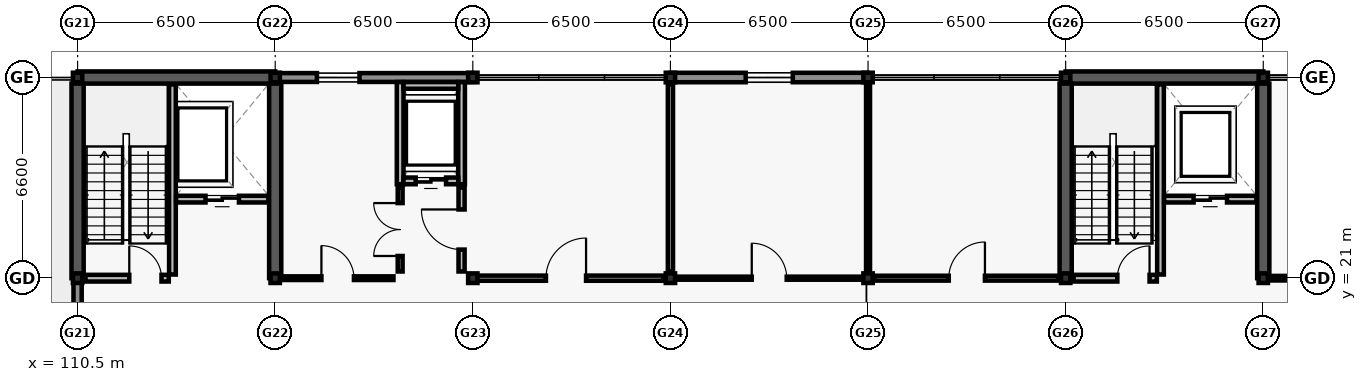
"""IFC4 building model, lengths in metres.
Left out: names, types, materials, properties, quantities, classifications, styles, units other than length and angle.
Written with IfcOpenShell. Run it as: python <this file> out.ifc"""

import sys

from ifc_helpers import new_model, si_unit, direction, frame, frame_2d, origin, origin_2d, place, context, subcontext, project, spatial, rectangle, i_section, extrude, element, fill, save


model = new_model("IFC4")
c1 = context("Model", 3, precision=1e-05, world=origin(), true_north=direction((0.0, 1.0)))
c2 = subcontext(c1, "Body", "Model", "MODEL_VIEW")
j1 = project(units=[si_unit("LENGTHUNIT", "METRE"), si_unit("PLANEANGLEUNIT", "RADIAN")], contexts=[c1])
p1 = place(None, origin())
s1 = spatial("IfcSite", under=j1, at=p1, CompositionType="ELEMENT")
p2 = place(p1, origin())
s2 = spatial("IfcBuilding", under=s1, at=p2, CompositionType="ELEMENT")
p3 = place(p2, frame((0.0, 0.0, 13.5)))
s3 = spatial("IfcBuildingStorey", under=s2, at=p3, CompositionType="ELEMENT", Elevation=13.5)
for number, where, z_axis, x_axis in (
    (1, (110.5, 21.0, 0.0), (0.0, 0.0, 1.0), (1.0, 0.0, 0.0)),
    (2, (110.5, 27.6, 0.0), (0.0, 0.0, 1.0), (1.0, 0.0, 0.0)),
    (3, (117.0, 21.0, 0.0), (0.0, 0.0, 1.0), (1.0, 0.0, 0.0)),
    (4, (117.0, 27.6, 0.0), (0.0, 0.0, 1.0), (1.0, 0.0, 0.0)),
    (5, (123.5, 21.0, 0.0), (0.0, 0.0, 1.0), (1.0, 0.0, 0.0)),
    (6, (123.5, 27.6, 0.0), (0.0, 0.0, 1.0), (1.0, 0.0, 0.0)),
    (7, (130.0, 21.0, 0.0), (0.0, 0.0, 1.0), (1.0, 0.0, 0.0)),
    (8, (130.0, 27.6, 0.0), (0.0, 0.0, 1.0), (1.0, 0.0, 0.0)),
    (9, (136.5, 21.0, 0.0), (0.0, 0.0, 1.0), (1.0, 0.0, 0.0)),
    (10, (136.5, 27.6, 0.0), (0.0, 0.0, 1.0), (1.0, 0.0, 0.0)),
    (11, (143.0, 21.0, 0.0), (0.0, 0.0, 1.0), (1.0, 0.0, 0.0)),
    (12, (143.0, 27.6, 0.0), (0.0, 0.0, 1.0), (1.0, 0.0, 0.0)),
    (13, (149.5, 21.0, 0.0), (0.0, 0.0, 1.0), (1.0, 0.0, 0.0)),
    (14, (149.5, 27.6, 0.0), (0.0, 0.0, 1.0), (1.0, 0.0, 0.0)),
):
    element("IfcColumn", number, at=place(p3, frame(where, z_axis=z_axis, x_axis=x_axis)), inside=s3, PredefinedType="COLUMN", context=c2, shape_type="SweptSolid", body=[
        extrude(i_section(OverallWidth=0.307, OverallDepth=0.315, WebThickness=0.012, FlangeThickness=0.019, FilletRadius=0.017, at=origin_2d()), origin(), (0.0, 0.0, 1.0), 3.9),
    ])
p4 = place(p3, frame((110.5, 27.6, 0.0), z_axis=(0.0, 0.0, 1.0), x_axis=(1.0, 0.0, 0.0)))
e15 = element("IfcWall", 15, at=p4, inside=s3, PredefinedType="SHEAR", context=c2, shape_type="SweptSolid", body=[
    extrude(rectangle(XDim=6.5, YDim=0.4, at=frame_2d((3.25, 0.0))), origin(), (0.0, 0.0, 1.0), 3.66),
])
for number, where, z_axis, x_axis in (
    (16, (110.5, 21.0, 0.0), (0.0, 0.0, 1.0), (0.0, 1.0, 0.0)),
    (17, (117.0, 21.0, 0.0), (0.0, 0.0, 1.0), (0.0, 1.0, 0.0)),
):
    element("IfcWall", number, at=place(p3, frame(where, z_axis=z_axis, x_axis=x_axis)), inside=s3, PredefinedType="SHEAR", context=c2, shape_type="SweptSolid", body=[
        extrude(rectangle(XDim=6.4, YDim=0.4, at=frame_2d((3.2, 0.0))), origin(), (0.0, 0.0, 1.0), 3.66),
    ])
p5 = place(p3, frame((143.0, 27.6, 0.0), z_axis=(0.0, 0.0, 1.0), x_axis=(1.0, 0.0, 0.0)))
e18 = element("IfcWall", 18, at=p5, inside=s3, PredefinedType="SHEAR", context=c2, shape_type="SweptSolid", body=[
    extrude(rectangle(XDim=6.5, YDim=0.4, at=frame_2d((3.25, 0.0))), origin(), (0.0, 0.0, 1.0), 3.66),
])
for number, where, z_axis, x_axis in (
    (19, (143.0, 21.0, 0.0), (0.0, 0.0, 1.0), (0.0, 1.0, 0.0)),
    (20, (149.5, 21.0, 0.0), (0.0, 0.0, 1.0), (0.0, 1.0, 0.0)),
):
    element("IfcWall", number, at=place(p3, frame(where, z_axis=z_axis, x_axis=x_axis)), inside=s3, PredefinedType="SHEAR", context=c2, shape_type="SweptSolid", body=[
        extrude(rectangle(XDim=6.4, YDim=0.4, at=frame_2d((3.2, 0.0))), origin(), (0.0, 0.0, 1.0), 3.66),
    ])
p6 = place(p3, frame((117.005, 27.6, 0.0), z_axis=(0.0, 0.0, 1.0), x_axis=(1.0, 0.0, 0.0)))
e21 = element("IfcWall", 21, at=p6, inside=s3, PredefinedType="SOLIDWALL", context=c2, shape_type="SweptSolid", body=[
    extrude(rectangle(XDim=6.49, YDim=0.29, at=frame_2d((3.245, 0.0))), origin(), (0.0, 0.0, 1.0), 3.02),
])
p7 = place(p6, frame((1.367, 0.0, 0.8)))
e22 = element("IfcOpeningElement", 22, at=p7, cuts=e21, PredefinedType="OPENING", context=c2, shape_type="SweptSolid", body=[
    extrude(rectangle(XDim=1.4, YDim=1.5, at=frame_2d((0.7, 0.75))), frame((0.0, 0.155, 0.0), z_axis=(0.0, -1.0, 0.0), x_axis=(1.0, 0.0, 0.0)), (0.0, 0.0, 1.0), 0.31),
])
p8 = place(p3, frame((130.005, 27.6, 0.0), z_axis=(0.0, 0.0, 1.0), x_axis=(1.0, 0.0, 0.0)))
e23 = element("IfcWall", 23, at=p8, inside=s3, PredefinedType="SOLIDWALL", context=c2, shape_type="SweptSolid", body=[
    extrude(rectangle(XDim=6.49, YDim=0.31, at=frame_2d((3.245, 0.0))), origin(), (0.0, 0.0, 1.0), 3.02),
])
p9 = place(p8, frame((2.47, 0.0, 0.8)))
e24 = element("IfcOpeningElement", 24, at=p9, cuts=e23, PredefinedType="OPENING", context=c2, shape_type="SweptSolid", body=[
    extrude(rectangle(XDim=1.55, YDim=1.5, at=frame_2d((0.775, 0.75))), frame((0.0, 0.165, 0.0), z_axis=(0.0, -1.0, 0.0), x_axis=(1.0, 0.0, 0.0)), (0.0, 0.0, 1.0), 0.33),
])
p10 = place(p3, frame((110.5, 14.405, 0.0), z_axis=(0.0, 0.0, 1.0), x_axis=(0.0, 1.0, 0.0)))
e25 = element("IfcWall", 25, at=p10, inside=s3, PredefinedType="SOLIDWALL", context=c2, shape_type="SweptSolid", body=[
    extrude(rectangle(XDim=6.59, YDim=0.27, at=frame_2d((3.295, 0.0))), origin(), (0.0, 0.0, 1.0), 3.02),
])
p11 = place(p10, frame((2.785, 0.0, 0.0)))
e26 = element("IfcOpeningElement", 26, at=p11, cuts=e25, PredefinedType="OPENING", context=c2, shape_type="SweptSolid", body=[
    extrude(rectangle(XDim=1.02, YDim=2.14, at=frame_2d((0.51, 1.07))), frame((0.0, 0.145, 0.0), z_axis=(0.0, -1.0, 0.0), x_axis=(1.0, 0.0, 0.0)), (0.0, 0.0, 1.0), 0.29),
])
p12 = place(p3, frame((113.62, 21.12, 0.0), z_axis=(0.0, 0.0, 1.0), x_axis=(0.0, 1.0, 0.0)))
e27 = element("IfcWall", 27, at=p12, inside=s3, PredefinedType="SOLIDWALL", context=c2, shape_type="SweptSolid", body=[
    extrude(rectangle(XDim=6.255, YDim=0.22, at=frame_2d((3.127, 0.0))), origin(), (0.0, 0.0, 1.0), 3.66),
])
p13 = place(p3, frame((110.76, 21.0, 0.0), z_axis=(0.0, 0.0, 1.0), x_axis=(1.0, 0.0, 0.0)))
e28 = element("IfcWall", 28, at=p13, inside=s3, PredefinedType="SOLIDWALL", context=c2, shape_type="SweptSolid", body=[
    extrude(rectangle(XDim=2.74, YDim=0.22, at=frame_2d((1.37, 0.0))), origin(), (0.0, 0.0, 1.0), 3.02),
])
p14 = place(p13, frame((1.44, 0.0, 0.0)))
e29 = element("IfcOpeningElement", 29, at=p14, cuts=e28, PredefinedType="OPENING", context=c2, shape_type="SweptSolid", body=[
    extrude(rectangle(XDim=1.06, YDim=2.1, at=frame_2d((0.53, 1.05))), frame((0.0, 0.12, 0.0), z_axis=(0.0, -1.0, 0.0), x_axis=(1.0, 0.0, 0.0)), (0.0, 0.0, 1.0), 0.24),
])
p15 = place(p3, frame((113.74, 23.6, 0.0), z_axis=(0.0, 0.0, 1.0), x_axis=(1.0, 0.0, 0.0)))
e30 = element("IfcWall", 30, at=p15, inside=s3, PredefinedType="SOLIDWALL", context=c2, shape_type="SweptSolid", body=[
    extrude(rectangle(XDim=3.035, YDim=0.22, at=frame_2d((1.518, 0.0))), origin(), (0.0, 0.0, 1.0), 3.66),
])
p16 = place(p15, frame((0.968, 0.0, 0.0)))
e31 = element("IfcOpeningElement", 31, at=p16, cuts=e30, PredefinedType="OPENING", context=c2, shape_type="SweptSolid", body=[
    extrude(rectangle(XDim=1.1, YDim=2.1, at=frame_2d((0.55, 1.05))), frame((0.0, 0.12, 0.0), z_axis=(0.0, -1.0, 0.0), x_axis=(1.0, 0.0, 0.0)), (0.0, 0.0, 1.0), 0.24),
])
for number, where, z_axis, x_axis in (
    (32, (121.11, 24.09, 0.0), (0.0, 0.0, 1.0), (0.0, 1.0, 0.0)),
    (33, (123.13, 24.09, 0.0), (0.0, 0.0, 1.0), (0.0, 1.0, 0.0)),
):
    element("IfcWall", number, at=place(p3, frame(where, z_axis=z_axis, x_axis=x_axis)), inside=s3, PredefinedType="SOLIDWALL", context=c2, shape_type="SweptSolid", body=[
        extrude(rectangle(XDim=3.36, YDim=0.22, at=frame_2d((1.68, 0.0))), origin(), (0.0, 0.0, 1.0), 3.66),
    ])
p17 = place(p3, frame((121.22, 27.34, 0.0), z_axis=(0.0, 0.0, 1.0), x_axis=(1.0, 0.0, 0.0)))
e34 = element("IfcWall", 34, at=p17, inside=s3, PredefinedType="SOLIDWALL", context=c2, shape_type="SweptSolid", body=[
    extrude(rectangle(XDim=1.8, YDim=0.22, at=frame_2d((0.9, 0.0))), origin(), (0.0, 0.0, 1.0), 3.66),
])
p18 = place(p3, frame((121.22, 24.2, 0.0), z_axis=(0.0, 0.0, 1.0), x_axis=(1.0, 0.0, 0.0)))
e35 = element("IfcWall", 35, at=p18, inside=s3, PredefinedType="SOLIDWALL", context=c2, shape_type="SweptSolid", body=[
    extrude(rectangle(XDim=1.8, YDim=0.22, at=frame_2d((0.9, 0.0))), origin(), (0.0, 0.0, 1.0), 3.66),
])
p19 = place(p18, frame((0.4, 0.0, 0.0)))
e36 = element("IfcOpeningElement", 36, at=p19, cuts=e35, PredefinedType="OPENING", context=c2, shape_type="SweptSolid", body=[
    extrude(rectangle(XDim=1.0, YDim=2.1, at=frame_2d((0.5, 1.05))), frame((0.0, 0.12, 0.0), z_axis=(0.0, -1.0, 0.0), x_axis=(1.0, 0.0, 0.0)), (0.0, 0.0, 1.0), 0.24),
])
p20 = place(p3, frame((146.12, 21.12, 0.0), z_axis=(0.0, 0.0, 1.0), x_axis=(0.0, 1.0, 0.0)))
e37 = element("IfcWall", 37, at=p20, inside=s3, PredefinedType="SOLIDWALL", context=c2, shape_type="SweptSolid", body=[
    extrude(rectangle(XDim=6.255, YDim=0.22, at=frame_2d((3.127, 0.0))), origin(), (0.0, 0.0, 1.0), 3.66),
])
p21 = place(p3, frame((143.26, 21.0, 0.0), z_axis=(0.0, 0.0, 1.0), x_axis=(1.0, 0.0, 0.0)))
e38 = element("IfcWall", 38, at=p21, inside=s3, PredefinedType="SOLIDWALL", context=c2, shape_type="SweptSolid", body=[
    extrude(rectangle(XDim=2.74, YDim=0.22, at=frame_2d((1.37, 0.0))), origin(), (0.0, 0.0, 1.0), 3.02),
])
p22 = place(p21, frame((1.44, 0.0, 0.0)))
e39 = element("IfcOpeningElement", 39, at=p22, cuts=e38, PredefinedType="OPENING", context=c2, shape_type="SweptSolid", body=[
    extrude(rectangle(XDim=1.06, YDim=2.1, at=frame_2d((0.53, 1.05))), frame((0.0, 0.12, 0.0), z_axis=(0.0, -1.0, 0.0), x_axis=(1.0, 0.0, 0.0)), (0.0, 0.0, 1.0), 0.24),
])
p23 = place(p3, frame((146.24, 23.6, 0.0), z_axis=(0.0, 0.0, 1.0), x_axis=(1.0, 0.0, 0.0)))
e40 = element("IfcWall", 40, at=p23, inside=s3, PredefinedType="SOLIDWALL", context=c2, shape_type="SweptSolid", body=[
    extrude(rectangle(XDim=3.035, YDim=0.22, at=frame_2d((1.518, 0.0))), origin(), (0.0, 0.0, 1.0), 3.66),
])
p24 = place(p23, frame((0.968, 0.0, 0.0)))
e41 = element("IfcOpeningElement", 41, at=p24, cuts=e40, PredefinedType="OPENING", context=c2, shape_type="SweptSolid", body=[
    extrude(rectangle(XDim=1.1, YDim=2.1, at=frame_2d((0.55, 1.05))), frame((0.0, 0.12, 0.0), z_axis=(0.0, -1.0, 0.0), x_axis=(1.0, 0.0, 0.0)), (0.0, 0.0, 1.0), 0.24),
])
p25 = place(p3, frame((121.11, 21.22, 0.0), z_axis=(0.0, 0.0, 1.0), x_axis=(0.0, 1.0, 0.0)))
e42 = element("IfcWall", 42, at=p25, inside=s3, PredefinedType="PARTITIONING", context=c2, shape_type="SweptSolid", body=[
    extrude(rectangle(XDim=2.76, YDim=0.16, at=frame_2d((1.38, 0.0))), origin(), (0.0, 0.0, 1.0), 3.0),
])
p26 = place(p25, frame((0.51, 0.0, 0.0)))
e43 = element("IfcOpeningElement", 43, at=p26, cuts=e42, PredefinedType="OPENING", context=c2, shape_type="SweptSolid", body=[
    extrude(rectangle(XDim=1.74, YDim=2.2, at=frame_2d((0.87, 1.1))), frame((0.0, 0.09, 0.0), z_axis=(0.0, -1.0, 0.0), x_axis=(1.0, 0.0, 0.0)), (0.0, 0.0, 1.0), 0.18),
])
p27 = place(p3, frame((123.13, 21.22, 0.0), z_axis=(0.0, 0.0, 1.0), x_axis=(0.0, 1.0, 0.0)))
e44 = element("IfcWall", 44, at=p27, inside=s3, PredefinedType="PARTITIONING", context=c2, shape_type="SweptSolid", body=[
    extrude(rectangle(XDim=2.76, YDim=0.2, at=frame_2d((1.38, 0.0))), origin(), (0.0, 0.0, 1.0), 3.0),
])
p28 = place(p27, frame((0.72, 0.0, 0.0)))
e45 = element("IfcOpeningElement", 45, at=p28, cuts=e44, PredefinedType="OPENING", context=c2, shape_type="SweptSolid", body=[
    extrude(rectangle(XDim=1.32, YDim=2.12, at=frame_2d((0.66, 1.06))), frame((0.0, 0.11, 0.0), z_axis=(0.0, -1.0, 0.0), x_axis=(1.0, 0.0, 0.0)), (0.0, 0.0, 1.0), 0.22),
])
p29 = place(p3, frame((117.22, 21.0, 0.0), z_axis=(0.0, 0.0, 1.0), x_axis=(1.0, 0.0, 0.0)))
e46 = element("IfcWall", 46, at=p29, inside=s3, PredefinedType="PARTITIONING", context=c2, shape_type="SweptSolid", body=[
    extrude(rectangle(XDim=3.67, YDim=0.12, at=frame_2d((1.835, 0.0))), origin(), (0.0, 0.0, 1.0), 3.0),
])
p30 = place(p29, frame((1.3, 0.0, 0.0)))
e47 = element("IfcOpeningElement", 47, at=p30, cuts=e46, PredefinedType="OPENING", context=c2, shape_type="SweptSolid", body=[
    extrude(rectangle(XDim=1.07, YDim=2.08, at=frame_2d((0.535, 1.04))), frame((0.0, 0.07, 0.0), z_axis=(0.0, -1.0, 0.0), x_axis=(1.0, 0.0, 0.0)), (0.0, 0.0, 1.0), 0.14),
])
p31 = place(p3, frame((123.35, 21.0, 0.0), z_axis=(0.0, 0.0, 1.0), x_axis=(1.0, 0.0, 0.0)))
e48 = element("IfcWall", 48, at=p31, inside=s3, PredefinedType="PARTITIONING", context=c2, shape_type="SweptSolid", body=[
    extrude(rectangle(XDim=6.43, YDim=0.17, at=frame_2d((3.215, 0.0))), origin(), (0.0, 0.0, 1.0), 3.0),
])
p32 = place(p31, frame((2.555, 0.0, 0.0)))
e49 = element("IfcOpeningElement", 49, at=p32, cuts=e48, PredefinedType="OPENING", context=c2, shape_type="SweptSolid", body=[
    extrude(rectangle(XDim=1.32, YDim=2.12, at=frame_2d((0.66, 1.06))), frame((0.0, 0.095, 0.0), z_axis=(0.0, -1.0, 0.0), x_axis=(1.0, 0.0, 0.0)), (0.0, 0.0, 1.0), 0.19),
])
p33 = place(p3, frame((130.22, 21.0, 0.0), z_axis=(0.0, 0.0, 1.0), x_axis=(1.0, 0.0, 0.0)))
e50 = element("IfcWall", 50, at=p33, inside=s3, PredefinedType="PARTITIONING", context=c2, shape_type="SweptSolid", body=[
    extrude(rectangle(XDim=6.06, YDim=0.1, at=frame_2d((3.03, 0.0))), origin(), (0.0, 0.0, 1.0), 3.0),
])
p34 = place(p33, frame((2.455, 0.0, 0.0)))
e51 = element("IfcOpeningElement", 51, at=p34, cuts=e50, PredefinedType="OPENING", context=c2, shape_type="SweptSolid", body=[
    extrude(rectangle(XDim=1.15, YDim=2.12, at=frame_2d((0.575, 1.06))), frame((0.0, 0.06, 0.0), z_axis=(0.0, -1.0, 0.0), x_axis=(1.0, 0.0, 0.0)), (0.0, 0.0, 1.0), 0.12),
])
p35 = place(p3, frame((136.72, 21.0, 0.0), z_axis=(0.0, 0.0, 1.0), x_axis=(1.0, 0.0, 0.0)))
e52 = element("IfcWall", 52, at=p35, inside=s3, PredefinedType="PARTITIONING", context=c2, shape_type="SweptSolid", body=[
    extrude(rectangle(XDim=6.06, YDim=0.16, at=frame_2d((3.03, 0.0))), origin(), (0.0, 0.0, 1.0), 3.0),
])
p36 = place(p35, frame((2.435, 0.0, 0.0)))
e53 = element("IfcOpeningElement", 53, at=p36, cuts=e52, PredefinedType="OPENING", context=c2, shape_type="SweptSolid", body=[
    extrude(rectangle(XDim=1.19, YDim=2.14, at=frame_2d((0.595, 1.07))), frame((0.0, 0.09, 0.0), z_axis=(0.0, -1.0, 0.0), x_axis=(1.0, 0.0, 0.0)), (0.0, 0.0, 1.0), 0.18),
])
p37 = place(p3, frame((149.72, 21.0, 0.0), z_axis=(0.0, 0.0, 1.0), x_axis=(1.0, 0.0, 0.0)))
e54 = element("IfcWall", 54, at=p37, inside=s3, PredefinedType="PARTITIONING", context=c2, shape_type="SweptSolid", body=[
    extrude(rectangle(XDim=12.46, YDim=0.15, at=frame_2d((6.23, 0.0))), origin(), (0.0, 0.0, 1.0), 3.0),
])
p38 = place(p37, frame((6.615, 0.0, 0.0)))
e55 = element("IfcOpeningElement", 55, at=p38, cuts=e54, PredefinedType="OPENING", context=c2, shape_type="SweptSolid", body=[
    extrude(rectangle(XDim=1.23, YDim=2.08, at=frame_2d((0.615, 1.04))), frame((0.0, 0.085, 0.0), z_axis=(0.0, -1.0, 0.0), x_axis=(1.0, 0.0, 0.0)), (0.0, 0.0, 1.0), 0.17),
])
p39 = place(p3, frame((130.0, 21.22, 0.0), z_axis=(0.0, 0.0, 1.0), x_axis=(0.0, 1.0, 0.0)))
e56 = element("IfcWall", 56, at=p39, inside=s3, PredefinedType="PARTITIONING", context=c2, shape_type="SweptSolid", body=[
    extrude(rectangle(XDim=6.16, YDim=0.17, at=frame_2d((3.08, 0.0))), origin(), (0.0, 0.0, 1.0), 3.0),
])
p40 = place(p3, frame((136.5, 21.22, 0.0), z_axis=(0.0, 0.0, 1.0), x_axis=(0.0, 1.0, 0.0)))
e57 = element("IfcWall", 57, at=p40, inside=s3, PredefinedType="PARTITIONING", context=c2, shape_type="SweptSolid", body=[
    extrude(rectangle(XDim=6.16, YDim=0.13, at=frame_2d((3.08, 0.0))), origin(), (0.0, 0.0, 1.0), 3.0),
])
p41 = place(p7, origin())
e58 = element("IfcWindow", 58, at=p41, inside=s3, PartitioningType="SINGLE_PANEL", PredefinedType="WINDOW", context=c2, shape_type="SweptSolid", body=[
    extrude(rectangle(XDim=1.4, YDim=1.5, at=frame_2d((0.7, 0.75))), frame((0.0, 0.03, 0.0), z_axis=(0.0, -1.0, 0.0), x_axis=(1.0, 0.0, 0.0)), (0.0, 0.0, 1.0), 0.06),
])
fill(e22, e58)
p42 = place(p9, origin())
e59 = element("IfcWindow", 59, at=p42, inside=s3, PartitioningType="SINGLE_PANEL", PredefinedType="WINDOW", context=c2, shape_type="SweptSolid", body=[
    extrude(rectangle(XDim=1.55, YDim=1.5, at=frame_2d((0.775, 0.75))), frame((0.0, 0.03, 0.0), z_axis=(0.0, -1.0, 0.0), x_axis=(1.0, 0.0, 0.0)), (0.0, 0.0, 1.0), 0.06),
])
fill(e24, e59)
p43 = place(p14, origin())
e60 = element("IfcDoor", 60, at=p43, inside=s3, OperationType="SINGLE_SWING_LEFT", PredefinedType="DOOR", context=c2, shape_type="SweptSolid", body=[
    extrude(rectangle(XDim=1.06, YDim=2.1, at=frame_2d((0.53, 1.05))), frame((0.0, 0.025, 0.0), z_axis=(0.0, -1.0, 0.0), x_axis=(1.0, 0.0, 0.0)), (0.0, 0.0, 1.0), 0.05),
])
fill(e29, e60)
p44 = place(p16, origin())
e61 = element("IfcDoor", 61, at=p44, inside=s3, OperationType="DOUBLE_DOOR_SLIDING", PredefinedType="DOOR", context=c2, shape_type="SweptSolid", body=[
    extrude(rectangle(XDim=1.1, YDim=2.1, at=frame_2d((0.55, 1.05))), frame((0.0, 0.025, 0.0), z_axis=(0.0, -1.0, 0.0), x_axis=(1.0, 0.0, 0.0)), (0.0, 0.0, 1.0), 0.05),
])
fill(e31, e61)
p45 = place(p19, origin())
e62 = element("IfcDoor", 62, at=p45, inside=s3, OperationType="DOUBLE_DOOR_SLIDING", PredefinedType="DOOR", context=c2, shape_type="SweptSolid", body=[
    extrude(rectangle(XDim=1.0, YDim=2.1, at=frame_2d((0.5, 1.05))), frame((0.0, 0.025, 0.0), z_axis=(0.0, -1.0, 0.0), x_axis=(1.0, 0.0, 0.0)), (0.0, 0.0, 1.0), 0.05),
])
fill(e36, e62)
p46 = place(p22, origin())
e63 = element("IfcDoor", 63, at=p46, inside=s3, OperationType="SINGLE_SWING_RIGHT", PredefinedType="DOOR", context=c2, shape_type="SweptSolid", body=[
    extrude(rectangle(XDim=1.06, YDim=2.1, at=frame_2d((0.53, 1.05))), frame((0.0, 0.025, 0.0), z_axis=(0.0, -1.0, 0.0), x_axis=(1.0, 0.0, 0.0)), (0.0, 0.0, 1.0), 0.05),
])
fill(e39, e63)
p47 = place(p24, origin())
e64 = element("IfcDoor", 64, at=p47, inside=s3, OperationType="DOUBLE_DOOR_SLIDING", PredefinedType="DOOR", context=c2, shape_type="SweptSolid", body=[
    extrude(rectangle(XDim=1.1, YDim=2.1, at=frame_2d((0.55, 1.05))), frame((0.0, 0.025, 0.0), z_axis=(0.0, -1.0, 0.0), x_axis=(1.0, 0.0, 0.0)), (0.0, 0.0, 1.0), 0.05),
])
fill(e41, e64)
p48 = place(p26, origin())
e65 = element("IfcDoor", 65, at=p48, inside=s3, OperationType="DOUBLE_DOOR_SINGLE_SWING", PredefinedType="DOOR", context=c2, shape_type="SweptSolid", body=[
    extrude(rectangle(XDim=1.74, YDim=2.2, at=frame_2d((0.87, 1.1))), frame((0.0, 0.025, 0.0), z_axis=(0.0, -1.0, 0.0), x_axis=(1.0, 0.0, 0.0)), (0.0, 0.0, 1.0), 0.05),
])
fill(e43, e65)
p49 = place(p28, origin())
e66 = element("IfcDoor", 66, at=p49, inside=s3, OperationType="SINGLE_SWING_RIGHT", PredefinedType="DOOR", context=c2, shape_type="SweptSolid", body=[
    extrude(rectangle(XDim=1.32, YDim=2.12, at=frame_2d((0.66, 1.06))), frame((0.0, 0.025, 0.0), z_axis=(0.0, -1.0, 0.0), x_axis=(1.0, 0.0, 0.0)), (0.0, 0.0, 1.0), 0.05),
])
fill(e45, e66)
p50 = place(p30, origin())
e67 = element("IfcDoor", 67, at=p50, inside=s3, OperationType="SINGLE_SWING_LEFT", PredefinedType="DOOR", context=c2, shape_type="SweptSolid", body=[
    extrude(rectangle(XDim=1.07, YDim=2.08, at=frame_2d((0.535, 1.04))), frame((0.0, 0.025, 0.0), z_axis=(0.0, -1.0, 0.0), x_axis=(1.0, 0.0, 0.0)), (0.0, 0.0, 1.0), 0.05),
])
fill(e47, e67)
p51 = place(p32, origin())
e68 = element("IfcDoor", 68, at=p51, inside=s3, OperationType="SINGLE_SWING_RIGHT", PredefinedType="DOOR", context=c2, shape_type="SweptSolid", body=[
    extrude(rectangle(XDim=1.32, YDim=2.12, at=frame_2d((0.66, 1.06))), frame((0.0, 0.025, 0.0), z_axis=(0.0, -1.0, 0.0), x_axis=(1.0, 0.0, 0.0)), (0.0, 0.0, 1.0), 0.05),
])
fill(e49, e68)
p52 = place(p34, origin())
e69 = element("IfcDoor", 69, at=p52, inside=s3, OperationType="SINGLE_SWING_LEFT", PredefinedType="DOOR", context=c2, shape_type="SweptSolid", body=[
    extrude(rectangle(XDim=1.15, YDim=2.12, at=frame_2d((0.575, 1.06))), frame((0.0, 0.025, 0.0), z_axis=(0.0, -1.0, 0.0), x_axis=(1.0, 0.0, 0.0)), (0.0, 0.0, 1.0), 0.05),
])
fill(e51, e69)
p53 = place(p36, origin())
e70 = element("IfcDoor", 70, at=p53, inside=s3, OperationType="SINGLE_SWING_RIGHT", PredefinedType="DOOR", context=c2, shape_type="SweptSolid", body=[
    extrude(rectangle(XDim=1.19, YDim=2.14, at=frame_2d((0.595, 1.07))), frame((0.0, 0.025, 0.0), z_axis=(0.0, -1.0, 0.0), x_axis=(1.0, 0.0, 0.0)), (0.0, 0.0, 1.0), 0.05),
])
fill(e53, e70)
save(model, sys.argv[1])
